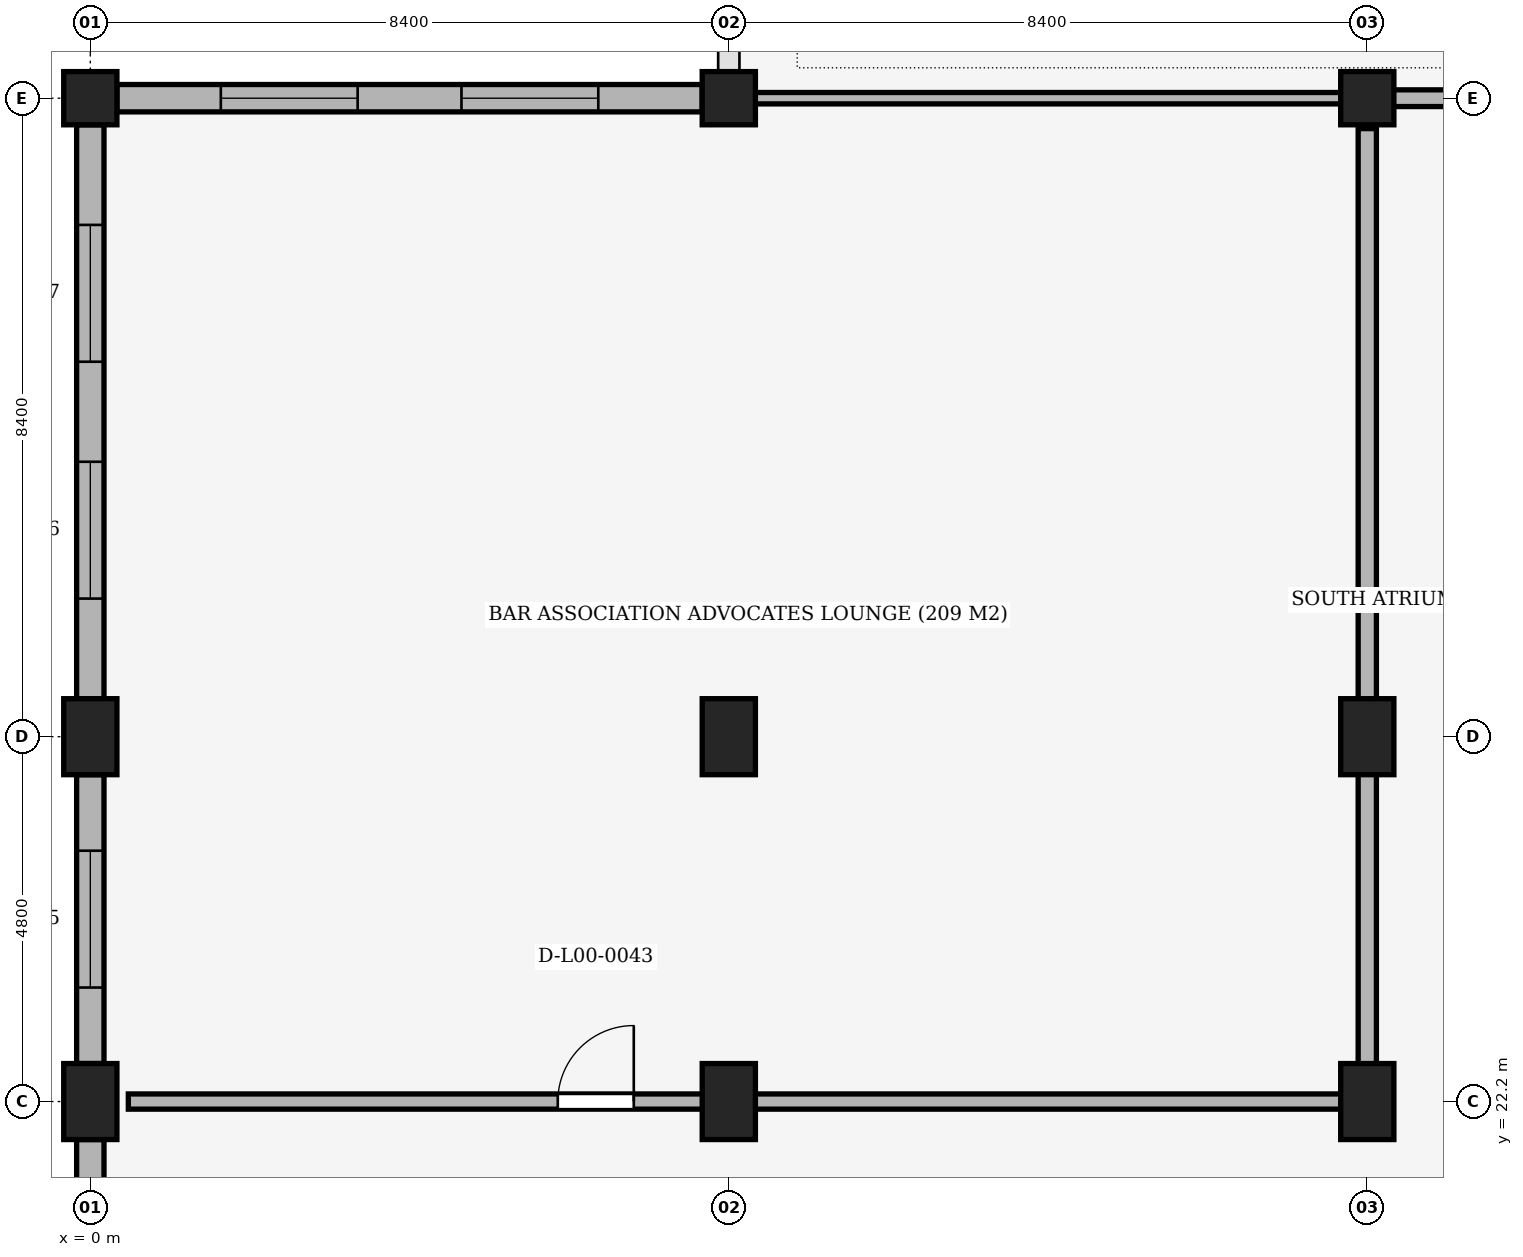
"""IFC4 building model, lengths in metres.
Left out: names, types, materials, properties, quantities, classifications, styles, units other than length and angle.
Written with IfcOpenShell. Run it as: python <this file> out.ifc"""

import sys

from ifc_helpers import new_model, si_unit, direction, frame, frame_2d, origin, origin_2d, place, context, subcontext, project, spatial, rectangle, extrude, element, fill, save


model = new_model("IFC4")
c1 = context("Model", 3, precision=1e-05, world=origin(), true_north=direction((0.0, 1.0)))
c2 = subcontext(c1, "Body", "Model", "MODEL_VIEW")
j1 = project(units=[si_unit("LENGTHUNIT", "METRE"), si_unit("PLANEANGLEUNIT", "RADIAN")], contexts=[c1])
p1 = place(None, origin())
s1 = spatial("IfcSite", under=j1, at=p1, CompositionType="ELEMENT")
p2 = place(p1, origin())
s2 = spatial("IfcBuilding", under=s1, at=p2, CompositionType="ELEMENT")
p3 = place(p2, origin())
s3 = spatial("IfcBuildingStorey", under=s2, at=p3, CompositionType="ELEMENT", Elevation=0.0)
for number, where, z_axis, x_axis in (
    (1, (0.0, 22.2, 0.0), (0.0, 0.0, 1.0), (1.0, 0.0, 0.0)),
    (2, (0.0, 27.0, 0.0), (0.0, 0.0, 1.0), (1.0, 0.0, 0.0)),
):
    element("IfcColumn", number, at=place(p3, frame(where, z_axis=z_axis, x_axis=x_axis)), inside=s3, PredefinedType="COLUMN", context=c2, shape_type="SweptSolid", body=[
        extrude(rectangle(XDim=0.7, YDim=1.0, at=origin_2d()), origin(), (0.0, 0.0, 1.0), 5.1),
    ])
p4 = place(p3, frame((0.0, 35.4, 0.0), z_axis=(0.0, 0.0, 1.0), x_axis=(1.0, 0.0, 0.0)))
e3 = element("IfcColumn", 3, at=p4, inside=s3, PredefinedType="COLUMN", context=c2, shape_type="SweptSolid", body=[
    extrude(rectangle(XDim=0.7, YDim=0.7, at=origin_2d()), origin(), (0.0, 0.0, 1.0), 5.1),
])
for number, where, z_axis, x_axis in (
    (4, (8.4, 22.2, 0.0), (0.0, 0.0, 1.0), (1.0, 0.0, 0.0)),
    (5, (8.4, 27.0, 0.0), (0.0, 0.0, 1.0), (1.0, 0.0, 0.0)),
):
    element("IfcColumn", number, at=place(p3, frame(where, z_axis=z_axis, x_axis=x_axis)), inside=s3, PredefinedType="COLUMN", context=c2, shape_type="SweptSolid", body=[
        extrude(rectangle(XDim=0.7, YDim=1.0, at=origin_2d()), origin(), (0.0, 0.0, 1.0), 5.1),
    ])
p5 = place(p3, frame((8.4, 35.4, 0.0), z_axis=(0.0, 0.0, 1.0), x_axis=(1.0, 0.0, 0.0)))
e6 = element("IfcColumn", 6, at=p5, inside=s3, PredefinedType="COLUMN", context=c2, shape_type="SweptSolid", body=[
    extrude(rectangle(XDim=0.7, YDim=0.7, at=origin_2d()), origin(), (0.0, 0.0, 1.0), 5.1),
])
for number, where, z_axis, x_axis in (
    (7, (16.8, 22.2, 0.0), (0.0, 0.0, 1.0), (1.0, 0.0, 0.0)),
    (8, (16.8, 27.0, 0.0), (0.0, 0.0, 1.0), (1.0, 0.0, 0.0)),
):
    element("IfcColumn", number, at=place(p3, frame(where, z_axis=z_axis, x_axis=x_axis)), inside=s3, PredefinedType="COLUMN", context=c2, shape_type="SweptSolid", body=[
        extrude(rectangle(XDim=0.7, YDim=1.0, at=origin_2d()), origin(), (0.0, 0.0, 1.0), 5.1),
    ])
p6 = place(p3, frame((16.8, 35.4, 0.0), z_axis=(0.0, 0.0, 1.0), x_axis=(1.0, 0.0, 0.0)))
e9 = element("IfcColumn", 9, at=p6, inside=s3, PredefinedType="COLUMN", context=c2, shape_type="SweptSolid", body=[
    extrude(rectangle(XDim=0.7, YDim=0.7, at=origin_2d()), origin(), (0.0, 0.0, 1.0), 5.1),
])
p7 = place(p3, frame((0.0, 5.9, 0.0), z_axis=(0.0, 0.0, 1.0), x_axis=(0.0, 1.0, 0.0)))
e10 = element("IfcWall", 10, at=p7, inside=s3, PredefinedType="SOLIDWALL", context=c2, shape_type="SweptSolid", body=[
    extrude(rectangle(XDim=15.8, YDim=0.36, at=frame_2d((7.9, 0.0))), origin(), (0.0, 0.0, 1.0), 3.67),
])
p8 = place(p7, frame((6.7, 0.0, 0.0)))
e11 = element("IfcOpeningElement", 11, at=p8, cuts=e10, PredefinedType="OPENING", context=c2, shape_type="SweptSolid", body=[
    extrude(rectangle(XDim=2.4, YDim=2.6, at=frame_2d((1.2, 1.3))), frame((0.0, 0.195, 0.0), z_axis=(0.0, -1.0, 0.0), x_axis=(1.0, 0.0, 0.0)), (0.0, 0.0, 1.0), 0.39),
])
p9 = place(p3, frame((0.0, 22.7, 0.0), z_axis=(0.0, 0.0, 1.0), x_axis=(0.0, 1.0, 0.0)))
e12 = element("IfcWall", 12, at=p9, inside=s3, PredefinedType="SOLIDWALL", context=c2, shape_type="SweptSolid", body=[
    extrude(rectangle(XDim=3.8, YDim=0.36, at=frame_2d((1.9, 0.0))), origin(), (0.0, 0.0, 1.0), 4.17),
])
p10 = place(p9, frame((1.0, 0.0, 0.85)))
e13 = element("IfcOpeningElement", 13, at=p10, cuts=e12, PredefinedType="OPENING", context=c2, shape_type="SweptSolid", body=[
    extrude(rectangle(XDim=1.8, YDim=2.4, at=frame_2d((0.9, 1.2))), frame((0.0, 0.195, 0.0), z_axis=(0.0, -1.0, 0.0), x_axis=(1.0, 0.0, 0.0)), (0.0, 0.0, 1.0), 0.39),
])
p11 = place(p3, frame((0.0, 27.5, 0.0), z_axis=(0.0, 0.0, 1.0), x_axis=(0.0, 1.0, 0.0)))
e14 = element("IfcWall", 14, at=p11, inside=s3, PredefinedType="SOLIDWALL", context=c2, shape_type="SweptSolid", body=[
    extrude(rectangle(XDim=7.55, YDim=0.36, at=frame_2d((3.775, 0.0))), origin(), (0.0, 0.0, 1.0), 4.02),
])
p12 = place(p11, frame((1.317, 0.0, 0.85)))
e15 = element("IfcOpeningElement", 15, at=p12, cuts=e14, PredefinedType="OPENING", context=c2, shape_type="SweptSolid", body=[
    extrude(rectangle(XDim=1.8, YDim=2.4, at=frame_2d((0.9, 1.2))), frame((0.0, 0.195, 0.0), z_axis=(0.0, -1.0, 0.0), x_axis=(1.0, 0.0, 0.0)), (0.0, 0.0, 1.0), 0.39),
])
p13 = place(p11, frame((4.433, 0.0, 0.85)))
e16 = element("IfcOpeningElement", 16, at=p13, cuts=e14, PredefinedType="OPENING", context=c2, shape_type="SweptSolid", body=[
    extrude(rectangle(XDim=1.8, YDim=2.4, at=frame_2d((0.9, 1.2))), frame((0.0, 0.195, 0.0), z_axis=(0.0, -1.0, 0.0), x_axis=(1.0, 0.0, 0.0)), (0.0, 0.0, 1.0), 0.39),
])
p14 = place(p3, frame((0.35, 35.4, 0.0), z_axis=(0.0, 0.0, 1.0), x_axis=(1.0, 0.0, 0.0)))
e17 = element("IfcWall", 17, at=p14, inside=s3, PredefinedType="SOLIDWALL", context=c2, shape_type="SweptSolid", body=[
    extrude(rectangle(XDim=7.7, YDim=0.36, at=frame_2d((3.85, 0.0))), origin(), (0.0, 0.0, 1.0), 4.07),
])
p15 = place(p14, frame((1.367, 0.0, 0.85)))
e18 = element("IfcOpeningElement", 18, at=p15, cuts=e17, PredefinedType="OPENING", context=c2, shape_type="SweptSolid", body=[
    extrude(rectangle(XDim=1.8, YDim=2.4, at=frame_2d((0.9, 1.2))), frame((0.0, 0.195, 0.0), z_axis=(0.0, -1.0, 0.0), x_axis=(1.0, 0.0, 0.0)), (0.0, 0.0, 1.0), 0.39),
])
p16 = place(p14, frame((4.533, 0.0, 0.85)))
e19 = element("IfcOpeningElement", 19, at=p16, cuts=e17, PredefinedType="OPENING", context=c2, shape_type="SweptSolid", body=[
    extrude(rectangle(XDim=1.8, YDim=2.4, at=frame_2d((0.9, 1.2))), frame((0.0, 0.195, 0.0), z_axis=(0.0, -1.0, 0.0), x_axis=(1.0, 0.0, 0.0)), (0.0, 0.0, 1.0), 0.39),
])
p17 = place(p3, frame((0.5, 22.2, 0.0), z_axis=(0.0, 0.0, 1.0), x_axis=(1.0, 0.0, 0.0)))
e20 = element("IfcWall", 20, at=p17, inside=s3, PredefinedType="PARTITIONING", context=c2, shape_type="SweptSolid", body=[
    extrude(rectangle(XDim=16.3, YDim=0.2, at=frame_2d((8.15, 0.0))), origin(), (0.0, 0.0, 1.0), 4.07),
])
p18 = place(p17, frame((5.65, 0.0, 0.0)))
e21 = element("IfcOpeningElement", 21, at=p18, cuts=e20, PredefinedType="OPENING", context=c2, shape_type="SweptSolid", body=[
    extrude(rectangle(XDim=1.0, YDim=2.2, at=frame_2d((0.5, 1.1))), frame((0.0, 0.115, 0.0), z_axis=(0.0, -1.0, 0.0), x_axis=(1.0, 0.0, 0.0)), (0.0, 0.0, 1.0), 0.23),
])
p19 = place(p3, frame((16.8, 35.4, 0.0), z_axis=(0.0, 0.0, 1.0), x_axis=(1.0, 0.0, 0.0)))
e22 = element("IfcWall", 22, at=p19, inside=s3, PredefinedType="PARTITIONING", context=c2, shape_type="SweptSolid", body=[
    extrude(rectangle(XDim=3.6, YDim=0.22, at=frame_2d((1.8, 0.0))), origin(), (0.0, 0.0, 1.0), 4.07),
])
p20 = place(p3, frame((8.425, 35.4, 0.0), z_axis=(0.0, 0.0, 1.0), x_axis=(1.0, 0.0, 0.0)))
e23 = element("IfcWall", 23, at=p20, inside=s3, PredefinedType="PARTITIONING", context=c2, shape_type="SweptSolid", body=[
    extrude(rectangle(XDim=8.375, YDim=0.15, at=frame_2d((4.188, 0.0))), origin(), (0.0, 0.0, 1.0), 4.07),
])
p21 = place(p3, frame((16.8, 22.302, 0.0), z_axis=(0.0, 0.0, 1.0), x_axis=(0.0, 1.0, 0.0)))
e24 = element("IfcWall", 24, at=p21, inside=s3, PredefinedType="PARTITIONING", context=c2, shape_type="SweptSolid", body=[
    extrude(rectangle(XDim=12.698, YDim=0.24, at=frame_2d((6.349, 0.0))), origin(), (0.0, 0.0, 1.0), 4.02),
])
p22 = place(p10, origin())
e25 = element("IfcWindow", 25, at=p22, inside=s3, PartitioningType="SINGLE_PANEL", PredefinedType="WINDOW", context=c2, shape_type="SweptSolid", body=[
    extrude(rectangle(XDim=1.8, YDim=2.4, at=frame_2d((0.9, 1.2))), frame((0.0, 0.03, 0.0), z_axis=(0.0, -1.0, 0.0), x_axis=(1.0, 0.0, 0.0)), (0.0, 0.0, 1.0), 0.06),
])
fill(e13, e25)
p23 = place(p12, origin())
e26 = element("IfcWindow", 26, at=p23, inside=s3, PartitioningType="SINGLE_PANEL", PredefinedType="WINDOW", context=c2, shape_type="SweptSolid", body=[
    extrude(rectangle(XDim=1.8, YDim=2.4, at=frame_2d((0.9, 1.2))), frame((0.0, 0.03, 0.0), z_axis=(0.0, -1.0, 0.0), x_axis=(1.0, 0.0, 0.0)), (0.0, 0.0, 1.0), 0.06),
])
fill(e15, e26)
p24 = place(p13, origin())
e27 = element("IfcWindow", 27, at=p24, inside=s3, PartitioningType="SINGLE_PANEL", PredefinedType="WINDOW", context=c2, shape_type="SweptSolid", body=[
    extrude(rectangle(XDim=1.8, YDim=2.4, at=frame_2d((0.9, 1.2))), frame((0.0, 0.03, 0.0), z_axis=(0.0, -1.0, 0.0), x_axis=(1.0, 0.0, 0.0)), (0.0, 0.0, 1.0), 0.06),
])
fill(e16, e27)
p25 = place(p15, origin())
e28 = element("IfcWindow", 28, at=p25, inside=s3, PartitioningType="SINGLE_PANEL", PredefinedType="WINDOW", context=c2, shape_type="SweptSolid", body=[
    extrude(rectangle(XDim=1.8, YDim=2.4, at=frame_2d((0.9, 1.2))), frame((0.0, 0.03, 0.0), z_axis=(0.0, -1.0, 0.0), x_axis=(1.0, 0.0, 0.0)), (0.0, 0.0, 1.0), 0.06),
])
fill(e18, e28)
p26 = place(p16, origin())
e29 = element("IfcWindow", 29, at=p26, inside=s3, PartitioningType="SINGLE_PANEL", PredefinedType="WINDOW", context=c2, shape_type="SweptSolid", body=[
    extrude(rectangle(XDim=1.8, YDim=2.4, at=frame_2d((0.9, 1.2))), frame((0.0, 0.03, 0.0), z_axis=(0.0, -1.0, 0.0), x_axis=(1.0, 0.0, 0.0)), (0.0, 0.0, 1.0), 0.06),
])
fill(e19, e29)
p27 = place(p18, origin())
e30 = element("IfcDoor", 30, at=p27, inside=s3, OperationType="SINGLE_SWING_RIGHT", PredefinedType="DOOR", context=c2, shape_type="SweptSolid", body=[
    extrude(rectangle(XDim=1.0, YDim=2.2, at=frame_2d((0.5, 1.1))), frame((0.0, 0.025, 0.0), z_axis=(0.0, -1.0, 0.0), x_axis=(1.0, 0.0, 0.0)), (0.0, 0.0, 1.0), 0.05),
])
fill(e21, e30)
save(model, sys.argv[1])
